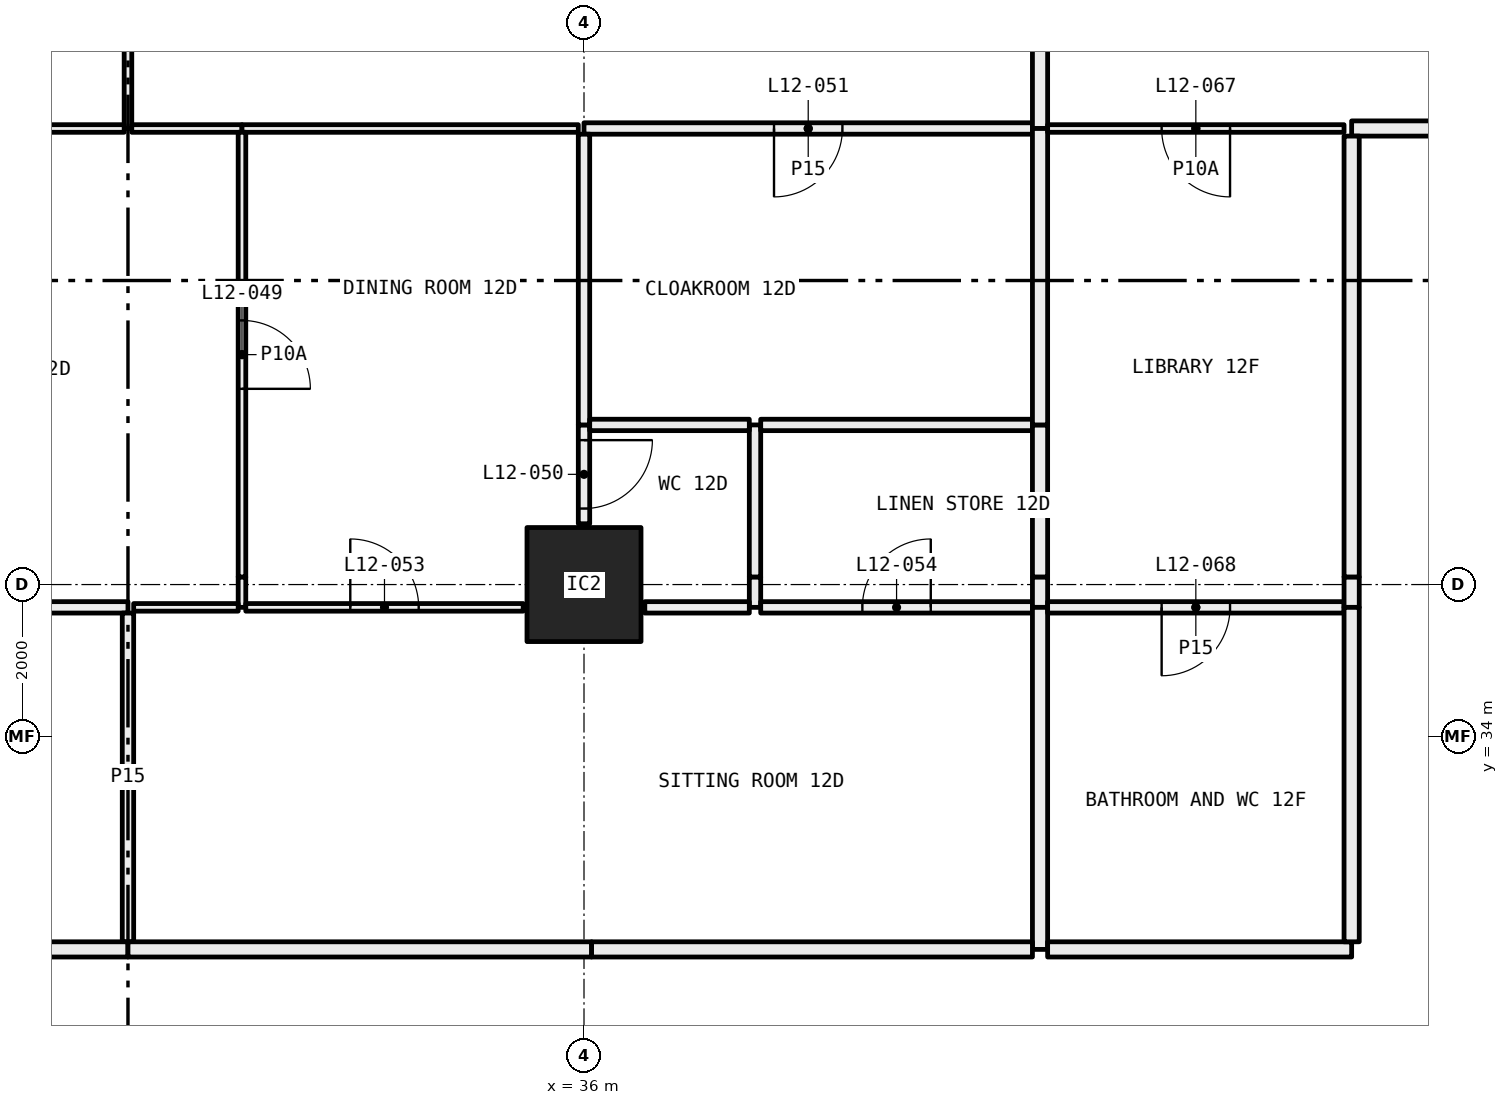
"""IFC4 building model, lengths in metres.
Left out: names, types, materials, properties, quantities, classifications, styles, units other than length and angle.
Written with IfcOpenShell. Run it as: python <this file> out.ifc"""

import sys

from ifc_helpers import new_model, si_unit, direction, frame, frame_2d, origin, origin_2d, place, context, subcontext, project, spatial, rectangle, hollow_rectangle, extrude, element, fill, save


model = new_model("IFC4")
c1 = context("Model", 3, precision=1e-05, world=origin(), true_north=direction((0.0, 1.0)))
c2 = subcontext(c1, "Body", "Model", "MODEL_VIEW")
j1 = project(units=[si_unit("LENGTHUNIT", "METRE"), si_unit("PLANEANGLEUNIT", "RADIAN")], contexts=[c1])
p1 = place(None, origin())
s1 = spatial("IfcSite", under=j1, at=p1, CompositionType="ELEMENT")
p2 = place(p1, origin())
s2 = spatial("IfcBuilding", under=s1, at=p2, CompositionType="ELEMENT")
p3 = place(p2, frame((0.0, 0.0, 54.15)))
s3 = spatial("IfcBuildingStorey", under=s2, at=p3, CompositionType="ELEMENT", Elevation=54.15)
p4 = place(p3, frame((36.0, 36.0, 0.0), z_axis=(0.0, 0.0, 1.0), x_axis=(1.0, 0.0, 0.0)))
e1 = element("IfcColumn", 1, at=p4, inside=s3, PredefinedType="COLUMN", context=c2, shape_type="SweptSolid", body=[
    extrude(hollow_rectangle(XDim=1.5, YDim=1.5, WallThickness=0.065, at=origin_2d()), origin(), (0.0, 0.0, 1.0), 3.05),
])
p5 = place(p3, frame((30.0, 42.0, 0.0), z_axis=(0.0, 0.0, 1.0), x_axis=(0.0, 1.0, 0.0)))
e2 = element("IfcWall", 2, at=p5, inside=s3, PredefinedType="PARTITIONING", context=c2, shape_type="SweptSolid", body=[
    extrude(rectangle(XDim=5.28, YDim=0.1, at=frame_2d((2.64, 0.0))), origin(), (0.0, 0.0, 1.0), 3.05),
])
p6 = place(p5, frame((2.19, 0.0, 0.0)))
e3 = element("IfcOpeningElement", 3, at=p6, cuts=e2, PredefinedType="OPENING", context=c2, shape_type="SweptSolid", body=[
    extrude(rectangle(XDim=0.9, YDim=2.1, at=frame_2d((0.45, 1.05))), frame((0.0, 0.06, 0.0), z_axis=(0.0, -1.0, 0.0), x_axis=(1.0, 0.0, 0.0)), (0.0, 0.0, 1.0), 0.12),
])
p7 = place(p3, frame((26.0, 42.0, 0.0), z_axis=(0.0, 0.0, 1.0), x_axis=(1.0, 0.0, 0.0)))
e4 = element("IfcWall", 4, at=p7, inside=s3, PredefinedType="PARTITIONING", context=c2, shape_type="SweptSolid", body=[
    extrude(rectangle(XDim=3.95, YDim=0.1, at=frame_2d((1.975, 0.0))), origin(), (0.0, 0.0, 1.0), 3.05),
])
p8 = place(p7, frame((1.525, 0.0, 0.0)))
e5 = element("IfcOpeningElement", 5, at=p8, cuts=e4, PredefinedType="OPENING", context=c2, shape_type="SweptSolid", body=[
    extrude(rectangle(XDim=0.9, YDim=2.1, at=frame_2d((0.45, 1.05))), frame((0.0, 0.06, 0.0), z_axis=(0.0, -1.0, 0.0), x_axis=(1.0, 0.0, 0.0)), (0.0, 0.0, 1.0), 0.12),
])
p9 = place(p3, frame((30.05, 42.0, 0.0), z_axis=(0.0, 0.0, 1.0), x_axis=(1.0, 0.0, 0.0)))
e6 = element("IfcWall", 6, at=p9, inside=s3, PredefinedType="PARTITIONING", context=c2, shape_type="SweptSolid", body=[
    extrude(rectangle(XDim=1.45, YDim=0.1, at=frame_2d((0.725, 0.0))), origin(), (0.0, 0.0, 1.0), 3.05),
])
p10 = place(p3, frame((31.5, 42.0, 0.0), z_axis=(0.0, 0.0, 1.0), x_axis=(1.0, 0.0, 0.0)))
e7 = element("IfcWall", 7, at=p10, inside=s3, PredefinedType="PARTITIONING", context=c2, shape_type="SweptSolid", body=[
    extrude(rectangle(XDim=4.425, YDim=0.1, at=frame_2d((2.212, 0.0))), origin(), (0.0, 0.0, 1.0), 2.45),
])
p11 = place(p3, frame((36.0, 42.0, 0.0), z_axis=(0.0, 0.0, 1.0), x_axis=(1.0, 0.0, 0.0)))
e8 = element("IfcWall", 8, at=p11, inside=s3, PredefinedType="PARTITIONING", context=c2, shape_type="SweptSolid", body=[
    extrude(rectangle(XDim=5.9, YDim=0.15, at=frame_2d((2.95, 0.0))), origin(), (0.0, 0.0, 1.0), 2.45),
])
p12 = place(p11, frame((2.5, 0.0, 0.0)))
e9 = element("IfcOpeningElement", 9, at=p12, cuts=e8, PredefinedType="OPENING", context=c2, shape_type="SweptSolid", body=[
    extrude(rectangle(XDim=0.9, YDim=2.1, at=frame_2d((0.45, 1.05))), frame((0.0, 0.085, 0.0), z_axis=(0.0, -1.0, 0.0), x_axis=(1.0, 0.0, 0.0)), (0.0, 0.0, 1.0), 0.17),
])
p13 = place(p3, frame((42.0, 42.0, 0.0), z_axis=(0.0, 0.0, 1.0), x_axis=(0.0, 1.0, 0.0)))
e10 = element("IfcWall", 10, at=p13, inside=s3, PredefinedType="PARTITIONING", context=c2, shape_type="SweptSolid", body=[
    extrude(rectangle(XDim=5.28, YDim=0.2, at=frame_2d((2.64, 0.0))), origin(), (0.0, 0.0, 1.0), 3.05),
])
p14 = place(p3, frame((31.5, 35.7, 0.0), z_axis=(0.0, 0.0, 1.0), x_axis=(0.0, 1.0, 0.0)))
e11 = element("IfcWall", 11, at=p14, inside=s3, PredefinedType="PARTITIONING", context=c2, shape_type="SweptSolid", body=[
    extrude(rectangle(XDim=0.4, YDim=0.1, at=frame_2d((0.2, 0.0))), origin(), (0.0, 0.0, 1.0), 2.45),
])
p15 = place(p3, frame((31.5, 36.1, 0.0), z_axis=(0.0, 0.0, 1.0), x_axis=(0.0, 1.0, 0.0)))
e12 = element("IfcWall", 12, at=p15, inside=s3, PredefinedType="PARTITIONING", context=c2, shape_type="SweptSolid", body=[
    extrude(rectangle(XDim=5.85, YDim=0.1, at=frame_2d((2.925, 0.0))), origin(), (0.0, 0.0, 1.0), 3.05),
])
p16 = place(p15, frame((2.475, 0.0, 0.0)))
e13 = element("IfcOpeningElement", 13, at=p16, cuts=e12, PredefinedType="OPENING", context=c2, shape_type="SweptSolid", body=[
    extrude(rectangle(XDim=0.9, YDim=2.1, at=frame_2d((0.45, 1.05))), frame((0.0, 0.06, 0.0), z_axis=(0.0, -1.0, 0.0), x_axis=(1.0, 0.0, 0.0)), (0.0, 0.0, 1.0), 0.12),
])
p17 = place(p3, frame((26.0, 35.7, 0.0), z_axis=(0.0, 0.0, 1.0), x_axis=(1.0, 0.0, 0.0)))
e14 = element("IfcWall", 14, at=p17, inside=s3, PredefinedType="PARTITIONING", context=c2, shape_type="SweptSolid", body=[
    extrude(rectangle(XDim=4.0, YDim=0.15, at=frame_2d((2.0, 0.0))), origin(), (0.0, 0.0, 1.0), 3.05),
])
p18 = place(p17, frame((1.55, 0.0, 0.0)))
e15 = element("IfcOpeningElement", 15, at=p18, cuts=e14, PredefinedType="OPENING", context=c2, shape_type="SweptSolid", body=[
    extrude(rectangle(XDim=0.9, YDim=2.1, at=frame_2d((0.45, 1.05))), frame((0.0, 0.085, 0.0), z_axis=(0.0, -1.0, 0.0), x_axis=(1.0, 0.0, 0.0)), (0.0, 0.0, 1.0), 0.17),
])
p19 = place(p3, frame((30.075, 35.7, 0.0), z_axis=(0.0, 0.0, 1.0), x_axis=(1.0, 0.0, 0.0)))
e16 = element("IfcWall", 16, at=p19, inside=s3, PredefinedType="PARTITIONING", context=c2, shape_type="SweptSolid", body=[
    extrude(rectangle(XDim=1.375, YDim=0.1, at=frame_2d((0.688, 0.0))), origin(), (0.0, 0.0, 1.0), 3.05),
])
p20 = place(p3, frame((36.0, 36.8, 0.0), z_axis=(0.0, 0.0, 1.0), x_axis=(0.0, 1.0, 0.0)))
e17 = element("IfcWall", 17, at=p20, inside=s3, PredefinedType="PARTITIONING", context=c2, shape_type="SweptSolid", body=[
    extrude(rectangle(XDim=1.3, YDim=0.15, at=frame_2d((0.65, 0.0))), origin(), (0.0, 0.0, 1.0), 2.45),
])
p21 = place(p20, frame((0.2, 0.0, 0.0)))
e18 = element("IfcOpeningElement", 18, at=p21, cuts=e17, PredefinedType="OPENING", context=c2, shape_type="SweptSolid", body=[
    extrude(rectangle(XDim=0.9, YDim=2.1, at=frame_2d((0.45, 1.05))), frame((0.0, 0.085, 0.0), z_axis=(0.0, -1.0, 0.0), x_axis=(1.0, 0.0, 0.0)), (0.0, 0.0, 1.0), 0.17),
])
p22 = place(p3, frame((36.0, 38.1, 0.0), z_axis=(0.0, 0.0, 1.0), x_axis=(0.0, 1.0, 0.0)))
e19 = element("IfcWall", 19, at=p22, inside=s3, PredefinedType="PARTITIONING", context=c2, shape_type="SweptSolid", body=[
    extrude(rectangle(XDim=3.825, YDim=0.15, at=frame_2d((1.913, 0.0))), origin(), (0.0, 0.0, 1.0), 2.45),
])
p23 = place(p3, frame((31.55, 35.7, 0.0), z_axis=(0.0, 0.0, 1.0), x_axis=(1.0, 0.0, 0.0)))
e20 = element("IfcWall", 20, at=p23, inside=s3, PredefinedType="PARTITIONING", context=c2, shape_type="SweptSolid", body=[
    extrude(rectangle(XDim=3.65, YDim=0.1, at=frame_2d((1.825, 0.0))), origin(), (0.0, 0.0, 1.0), 3.05),
])
p24 = place(p23, frame((1.375, 0.0, 0.0)))
e21 = element("IfcOpeningElement", 21, at=p24, cuts=e20, PredefinedType="OPENING", context=c2, shape_type="SweptSolid", body=[
    extrude(rectangle(XDim=0.9, YDim=2.1, at=frame_2d((0.45, 1.05))), frame((0.0, 0.06, 0.0), z_axis=(0.0, -1.0, 0.0), x_axis=(1.0, 0.0, 0.0)), (0.0, 0.0, 1.0), 0.12),
])
p25 = place(p3, frame((38.25, 35.7, 0.0), z_axis=(0.0, 0.0, 1.0), x_axis=(0.0, 1.0, 0.0)))
e22 = element("IfcWall", 22, at=p25, inside=s3, PredefinedType="PARTITIONING", context=c2, shape_type="SweptSolid", body=[
    extrude(rectangle(XDim=0.4, YDim=0.15, at=frame_2d((0.2, 0.0))), origin(), (0.0, 0.0, 1.0), 2.45),
])
p26 = place(p3, frame((38.25, 36.1, 0.0), z_axis=(0.0, 0.0, 1.0), x_axis=(0.0, 1.0, 0.0)))
e23 = element("IfcWall", 23, at=p26, inside=s3, PredefinedType="PARTITIONING", context=c2, shape_type="SweptSolid", body=[
    extrude(rectangle(XDim=2.0, YDim=0.15, at=frame_2d((1.0, 0.0))), origin(), (0.0, 0.0, 1.0), 3.05),
])
p27 = place(p3, frame((38.175, 38.1, 0.0), z_axis=(0.0, 0.0, 1.0), x_axis=(-1.0, 0.0, 0.0)))
e24 = element("IfcWall", 24, at=p27, inside=s3, PredefinedType="PARTITIONING", context=c2, shape_type="SweptSolid", body=[
    extrude(rectangle(XDim=2.1, YDim=0.15, at=frame_2d((1.05, 0.0))), origin(), (0.0, 0.0, 1.0), 2.45),
])
p28 = place(p3, frame((36.8, 35.7, 0.0), z_axis=(0.0, 0.0, 1.0), x_axis=(1.0, 0.0, 0.0)))
e25 = element("IfcWall", 25, at=p28, inside=s3, PredefinedType="PARTITIONING", context=c2, shape_type="SweptSolid", body=[
    extrude(rectangle(XDim=1.375, YDim=0.15, at=frame_2d((0.688, 0.0))), origin(), (0.0, 0.0, 1.0), 3.05),
])
p29 = place(p3, frame((41.9, 38.1, 0.0), z_axis=(0.0, 0.0, 1.0), x_axis=(-1.0, 0.0, 0.0)))
e26 = element("IfcWall", 26, at=p29, inside=s3, PredefinedType="PARTITIONING", context=c2, shape_type="SweptSolid", body=[
    extrude(rectangle(XDim=3.575, YDim=0.15, at=frame_2d((1.788, 0.0))), origin(), (0.0, 0.0, 1.0), 3.05),
])
p30 = place(p3, frame((38.325, 35.7, 0.0), z_axis=(0.0, 0.0, 1.0), x_axis=(1.0, 0.0, 0.0)))
e27 = element("IfcWall", 27, at=p30, inside=s3, PredefinedType="PARTITIONING", context=c2, shape_type="SweptSolid", body=[
    extrude(rectangle(XDim=3.575, YDim=0.15, at=frame_2d((1.788, 0.0))), origin(), (0.0, 0.0, 1.0), 3.05),
])
p31 = place(p30, frame((1.337, 0.0, 0.0)))
e28 = element("IfcOpeningElement", 28, at=p31, cuts=e27, PredefinedType="OPENING", context=c2, shape_type="SweptSolid", body=[
    extrude(rectangle(XDim=0.9, YDim=2.1, at=frame_2d((0.45, 1.05))), frame((0.0, 0.085, 0.0), z_axis=(0.0, -1.0, 0.0), x_axis=(1.0, 0.0, 0.0)), (0.0, 0.0, 1.0), 0.17),
])
p32 = place(p3, frame((42.0, 35.7, 0.0), z_axis=(0.0, 0.0, 1.0), x_axis=(0.0, 1.0, 0.0)))
e29 = element("IfcWall", 29, at=p32, inside=s3, PredefinedType="PARTITIONING", context=c2, shape_type="SweptSolid", body=[
    extrude(rectangle(XDim=0.4, YDim=0.2, at=frame_2d((0.2, 0.0))), origin(), (0.0, 0.0, 1.0), 2.45),
])
p33 = place(p3, frame((42.0, 36.1, 0.0), z_axis=(0.0, 0.0, 1.0), x_axis=(0.0, 1.0, 0.0)))
e30 = element("IfcWall", 30, at=p33, inside=s3, PredefinedType="PARTITIONING", context=c2, shape_type="SweptSolid", body=[
    extrude(rectangle(XDim=2.0, YDim=0.2, at=frame_2d((1.0, 0.0))), origin(), (0.0, 0.0, 1.0), 3.05),
])
p34 = place(p3, frame((42.0, 38.1, 0.0), z_axis=(0.0, 0.0, 1.0), x_axis=(0.0, 1.0, 0.0)))
e31 = element("IfcWall", 31, at=p34, inside=s3, PredefinedType="PARTITIONING", context=c2, shape_type="SweptSolid", body=[
    extrude(rectangle(XDim=3.9, YDim=0.2, at=frame_2d((1.95, 0.0))), origin(), (0.0, 0.0, 1.0), 3.05),
])
p35 = place(p3, frame((30.0, 31.3, 0.0), z_axis=(0.0, 0.0, 1.0), x_axis=(0.0, 1.0, 0.0)))
e32 = element("IfcWall", 32, at=p35, inside=s3, PredefinedType="PARTITIONING", context=c2, shape_type="SweptSolid", body=[
    extrude(rectangle(XDim=4.325, YDim=0.15, at=frame_2d((2.163, 0.0))), origin(), (0.0, 0.0, 1.0), 3.05),
])
p36 = place(p3, frame((26.0, 31.2, 0.0), z_axis=(0.0, 0.0, 1.0), x_axis=(1.0, 0.0, 0.0)))
e33 = element("IfcWall", 33, at=p36, inside=s3, PredefinedType="PARTITIONING", context=c2, shape_type="SweptSolid", body=[
    extrude(rectangle(XDim=4.0, YDim=0.2, at=frame_2d((2.0, 0.0))), origin(), (0.0, 0.0, 1.0), 3.05),
])
p37 = place(p3, frame((42.0, 31.2, 0.0), z_axis=(0.0, 0.0, 1.0), x_axis=(0.0, 1.0, 0.0)))
e34 = element("IfcWall", 34, at=p37, inside=s3, PredefinedType="PARTITIONING", context=c2, shape_type="SweptSolid", body=[
    extrude(rectangle(XDim=4.5, YDim=0.2, at=frame_2d((2.25, 0.0))), origin(), (0.0, 0.0, 1.0), 3.05),
])
p38 = place(p3, frame((30.0, 31.2, 0.0), z_axis=(0.0, 0.0, 1.0), x_axis=(1.0, 0.0, 0.0)))
e35 = element("IfcWall", 35, at=p38, inside=s3, PredefinedType="PARTITIONING", context=c2, shape_type="SweptSolid", body=[
    extrude(rectangle(XDim=6.1, YDim=0.2, at=frame_2d((3.05, 0.0))), origin(), (0.0, 0.0, 1.0), 2.45),
])
p39 = place(p3, frame((36.1, 31.2, 0.0), z_axis=(0.0, 0.0, 1.0), x_axis=(1.0, 0.0, 0.0)))
e36 = element("IfcWall", 36, at=p39, inside=s3, PredefinedType="PARTITIONING", context=c2, shape_type="SweptSolid", body=[
    extrude(rectangle(XDim=5.8, YDim=0.2, at=frame_2d((2.9, 0.0))), origin(), (0.0, 0.0, 1.0), 3.05),
])
p40 = place(p3, frame((42.1, 42.0, 0.0), z_axis=(0.0, 0.0, 1.0), x_axis=(1.0, 0.0, 0.0)))
e37 = element("IfcWall", 37, at=p40, inside=s3, PredefinedType="PARTITIONING", context=c2, shape_type="SweptSolid", body=[
    extrude(rectangle(XDim=3.9, YDim=0.1, at=frame_2d((1.95, 0.0))), origin(), (0.0, 0.0, 1.0), 3.05),
])
p41 = place(p40, frame((1.5, 0.0, 0.0)))
e38 = element("IfcOpeningElement", 38, at=p41, cuts=e37, PredefinedType="OPENING", context=c2, shape_type="SweptSolid", body=[
    extrude(rectangle(XDim=0.9, YDim=2.1, at=frame_2d((0.45, 1.05))), frame((0.0, 0.06, 0.0), z_axis=(0.0, -1.0, 0.0), x_axis=(1.0, 0.0, 0.0)), (0.0, 0.0, 1.0), 0.12),
])
p42 = place(p3, frame((46.1, 42.0, 0.0), z_axis=(0.0, 0.0, 1.0), x_axis=(1.0, 0.0, 0.0)))
e39 = element("IfcWall", 39, at=p42, inside=s3, PredefinedType="PARTITIONING", context=c2, shape_type="SweptSolid", body=[
    extrude(rectangle(XDim=1.9, YDim=0.2, at=frame_2d((0.95, 0.0))), origin(), (0.0, 0.0, 1.0), 3.05),
])
p43 = place(p3, frame((42.1, 35.7, 0.0), z_axis=(0.0, 0.0, 1.0), x_axis=(1.0, 0.0, 0.0)))
e40 = element("IfcWall", 40, at=p43, inside=s3, PredefinedType="PARTITIONING", context=c2, shape_type="SweptSolid", body=[
    extrude(rectangle(XDim=3.9, YDim=0.15, at=frame_2d((1.95, 0.0))), origin(), (0.0, 0.0, 1.0), 3.05),
])
p44 = place(p43, frame((1.5, 0.0, 0.0)))
e41 = element("IfcOpeningElement", 41, at=p44, cuts=e40, PredefinedType="OPENING", context=c2, shape_type="SweptSolid", body=[
    extrude(rectangle(XDim=0.9, YDim=2.1, at=frame_2d((0.45, 1.05))), frame((0.0, 0.085, 0.0), z_axis=(0.0, -1.0, 0.0), x_axis=(1.0, 0.0, 0.0)), (0.0, 0.0, 1.0), 0.17),
])
p45 = place(p3, frame((46.1, 35.7, 0.0), z_axis=(0.0, 0.0, 1.0), x_axis=(0.0, 1.0, 0.0)))
e42 = element("IfcWall", 42, at=p45, inside=s3, PredefinedType="PARTITIONING", context=c2, shape_type="SweptSolid", body=[
    extrude(rectangle(XDim=0.4, YDim=0.2, at=frame_2d((0.2, 0.0))), origin(), (0.0, 0.0, 1.0), 2.45),
])
p46 = place(p3, frame((46.1, 36.1, 0.0), z_axis=(0.0, 0.0, 1.0), x_axis=(0.0, 1.0, 0.0)))
e43 = element("IfcWall", 43, at=p46, inside=s3, PredefinedType="PARTITIONING", context=c2, shape_type="SweptSolid", body=[
    extrude(rectangle(XDim=5.8, YDim=0.2, at=frame_2d((2.9, 0.0))), origin(), (0.0, 0.0, 1.0), 3.05),
])
p47 = place(p3, frame((42.1, 31.2, 0.0), z_axis=(0.0, 0.0, 1.0), x_axis=(1.0, 0.0, 0.0)))
e44 = element("IfcWall", 44, at=p47, inside=s3, PredefinedType="PARTITIONING", context=c2, shape_type="SweptSolid", body=[
    extrude(rectangle(XDim=4.0, YDim=0.2, at=frame_2d((2.0, 0.0))), origin(), (0.0, 0.0, 1.0), 3.05),
])
p48 = place(p3, frame((46.1, 31.3, 0.0), z_axis=(0.0, 0.0, 1.0), x_axis=(0.0, 1.0, 0.0)))
e45 = element("IfcWall", 45, at=p48, inside=s3, PredefinedType="PARTITIONING", context=c2, shape_type="SweptSolid", body=[
    extrude(rectangle(XDim=4.4, YDim=0.2, at=frame_2d((2.2, 0.0))), origin(), (0.0, 0.0, 1.0), 3.05),
])
p49 = place(p16, frame((0.9, 0.0, 0.0), x_axis=(-1.0, 0.0, 0.0)))
e46 = element("IfcDoor", 46, at=p49, inside=s3, OperationType="SINGLE_SWING_LEFT", PredefinedType="DOOR", context=c2, shape_type="SweptSolid", body=[
    extrude(rectangle(XDim=0.9, YDim=2.1, at=frame_2d((0.45, 1.05))), frame((0.0, 0.025, 0.0), z_axis=(0.0, -1.0, 0.0), x_axis=(1.0, 0.0, 0.0)), (0.0, 0.0, 1.0), 0.05),
])
fill(e13, e46)
p50 = place(p21, frame((0.9, 0.0, 0.0), x_axis=(-1.0, 0.0, 0.0)))
e47 = element("IfcDoor", 47, at=p50, inside=s3, OperationType="SINGLE_SWING_RIGHT", PredefinedType="DOOR", context=c2, shape_type="SweptSolid", body=[
    extrude(rectangle(XDim=0.9, YDim=2.1, at=frame_2d((0.45, 1.05))), frame((0.0, 0.025, 0.0), z_axis=(0.0, -1.0, 0.0), x_axis=(1.0, 0.0, 0.0)), (0.0, 0.0, 1.0), 0.05),
])
fill(e18, e47)
p51 = place(p12, frame((0.9, 0.0, 0.0), x_axis=(-1.0, 0.0, 0.0)))
e48 = element("IfcDoor", 48, at=p51, inside=s3, OperationType="SINGLE_SWING_LEFT", PredefinedType="DOOR", context=c2, shape_type="SweptSolid", body=[
    extrude(rectangle(XDim=0.9, YDim=2.1, at=frame_2d((0.45, 1.05))), frame((0.0, 0.025, 0.0), z_axis=(0.0, -1.0, 0.0), x_axis=(1.0, 0.0, 0.0)), (0.0, 0.0, 1.0), 0.05),
])
fill(e9, e48)
p52 = place(p24, origin())
e49 = element("IfcDoor", 49, at=p52, inside=s3, OperationType="SINGLE_SWING_RIGHT", PredefinedType="DOOR", context=c2, shape_type="SweptSolid", body=[
    extrude(rectangle(XDim=0.9, YDim=2.1, at=frame_2d((0.45, 1.05))), frame((0.0, 0.025, 0.0), z_axis=(0.0, -1.0, 0.0), x_axis=(1.0, 0.0, 0.0)), (0.0, 0.0, 1.0), 0.05),
])
fill(e21, e49)
p53 = place(p31, origin())
e50 = element("IfcDoor", 50, at=p53, inside=s3, OperationType="SINGLE_SWING_LEFT", PredefinedType="DOOR", context=c2, shape_type="SweptSolid", body=[
    extrude(rectangle(XDim=0.9, YDim=2.1, at=frame_2d((0.45, 1.05))), frame((0.0, 0.025, 0.0), z_axis=(0.0, -1.0, 0.0), x_axis=(1.0, 0.0, 0.0)), (0.0, 0.0, 1.0), 0.05),
])
fill(e28, e50)
p54 = place(p41, frame((0.9, 0.0, 0.0), x_axis=(-1.0, 0.0, 0.0)))
e51 = element("IfcDoor", 51, at=p54, inside=s3, OperationType="SINGLE_SWING_RIGHT", PredefinedType="DOOR", context=c2, shape_type="SweptSolid", body=[
    extrude(rectangle(XDim=0.9, YDim=2.1, at=frame_2d((0.45, 1.05))), frame((0.0, 0.025, 0.0), z_axis=(0.0, -1.0, 0.0), x_axis=(1.0, 0.0, 0.0)), (0.0, 0.0, 1.0), 0.05),
])
fill(e38, e51)
p55 = place(p44, frame((0.9, 0.0, 0.0), x_axis=(-1.0, 0.0, 0.0)))
e52 = element("IfcDoor", 52, at=p55, inside=s3, OperationType="SINGLE_SWING_LEFT", PredefinedType="DOOR", context=c2, shape_type="SweptSolid", body=[
    extrude(rectangle(XDim=0.9, YDim=2.1, at=frame_2d((0.45, 1.05))), frame((0.0, 0.025, 0.0), z_axis=(0.0, -1.0, 0.0), x_axis=(1.0, 0.0, 0.0)), (0.0, 0.0, 1.0), 0.05),
])
fill(e41, e52)
save(model, sys.argv[1])
